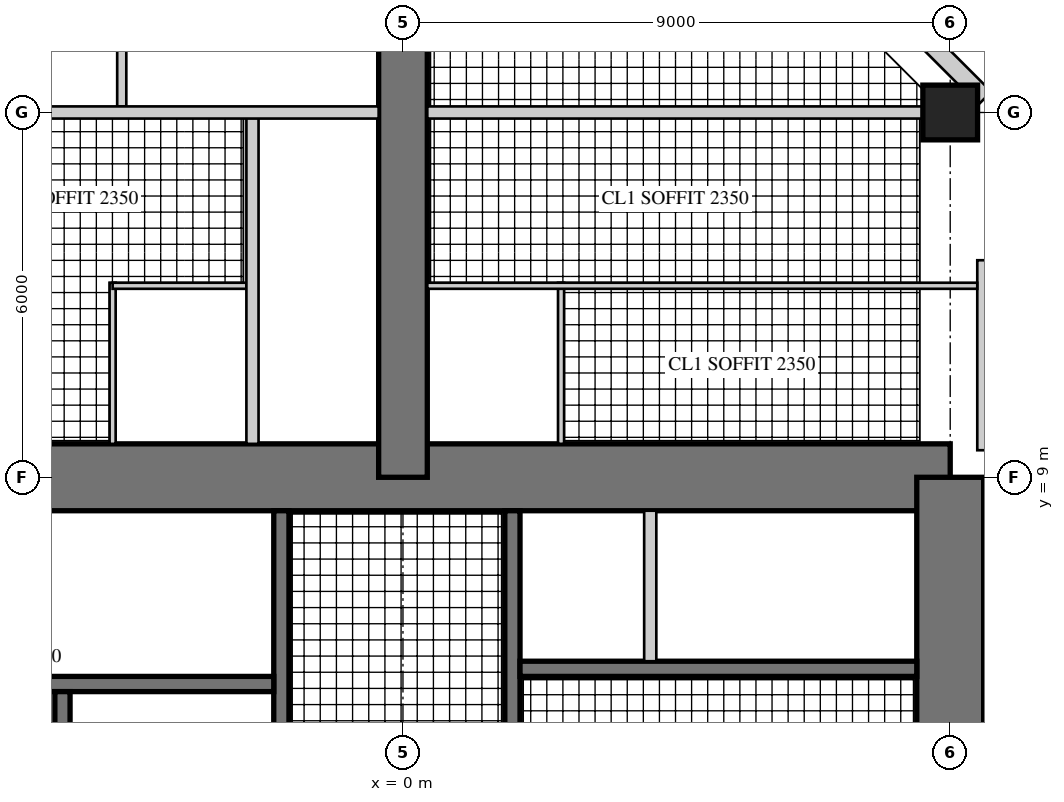
"""IFC4 building model, lengths in metres.
Left out: names, types, materials, properties, quantities, classifications, styles, units other than length and angle.
Written with IfcOpenShell. Run it as: python <this file> out.ifc"""

import sys

from ifc_helpers import new_model, si_unit, direction, frame, frame_2d, origin, origin_2d, place, context, subcontext, project, spatial, rectangle, hollow_rectangle, extrude, element, fill, save


model = new_model("IFC4")
c1 = context("Model", 3, precision=1e-05, world=origin(), true_north=direction((0.0, 1.0)))
c2 = subcontext(c1, "Body", "Model", "MODEL_VIEW")
j1 = project(units=[si_unit("LENGTHUNIT", "METRE"), si_unit("PLANEANGLEUNIT", "RADIAN")], contexts=[c1])
p1 = place(None, origin())
s1 = spatial("IfcSite", under=j1, at=p1, CompositionType="ELEMENT")
p2 = place(p1, origin())
s2 = spatial("IfcBuilding", under=s1, at=p2, CompositionType="ELEMENT")
p3 = place(p2, frame((0.0, 0.0, 200.1)))
s3 = spatial("IfcBuildingStorey", under=s2, at=p3, CompositionType="ELEMENT", Elevation=200.1)
p4 = place(p3, frame((9.0, 9.0, 0.0), z_axis=(0.0, 0.0, 1.0), x_axis=(-1.0, 0.0, 0.0)))
e1 = element("IfcWall", 1, at=p4, inside=s3, PredefinedType="SHEAR", context=c2, shape_type="SweptSolid", body=[
    extrude(rectangle(XDim=18.0, YDim=1.1, at=frame_2d((9.0, 0.0))), origin(), (0.0, 0.0, 1.0), 3.4),
])
p5 = place(p4, frame((9.8, 0.0, 0.0)))
e2 = element("IfcOpeningElement", 2, at=p5, cuts=e1, PredefinedType="OPENING", context=c2, shape_type="SweptSolid", body=[
    extrude(rectangle(XDim=1.0, YDim=2.4, at=frame_2d((0.5, 1.2))), frame((0.0, 0.56, 0.0), z_axis=(0.0, -1.0, 0.0), x_axis=(1.0, 0.0, 0.0)), (0.0, 0.0, 1.0), 1.12),
])
p6 = place(p3, frame((9.0, -9.0, 0.0), z_axis=(0.0, 0.0, 1.0), x_axis=(0.0, 1.0, 0.0)))
e3 = element("IfcWall", 3, at=p6, inside=s3, PredefinedType="SHEAR", context=c2, shape_type="SweptSolid", body=[
    extrude(rectangle(XDim=18.0, YDim=1.1, at=frame_2d((9.0, 0.0))), origin(), (0.0, 0.0, 1.0), 3.4),
])
p7 = place(p6, frame((9.8, 0.0, 0.0)))
e4 = element("IfcOpeningElement", 4, at=p7, cuts=e3, PredefinedType="OPENING", context=c2, shape_type="SweptSolid", body=[
    extrude(rectangle(XDim=1.0, YDim=2.4, at=frame_2d((0.5, 1.2))), frame((0.0, 0.56, 0.0), z_axis=(0.0, -1.0, 0.0), x_axis=(1.0, 0.0, 0.0)), (0.0, 0.0, 1.0), 1.12),
])
p8 = place(p3, frame((1.8, 1.875, 0.0), z_axis=(0.0, 0.0, 1.0), x_axis=(0.0, 1.0, 0.0)))
e5 = element("IfcWall", 5, at=p8, inside=s3, PredefinedType="SHEAR", context=c2, shape_type="SweptSolid", body=[
    extrude(rectangle(XDim=6.575, YDim=0.25, at=frame_2d((3.288, 0.0))), origin(), (0.0, 0.0, 1.0), 3.4),
])
p9 = place(p8, frame((1.875, 0.0, 0.0)))
e6 = element("IfcOpeningElement", 6, at=p9, cuts=e5, PredefinedType="OPENING", context=c2, shape_type="SweptSolid", body=[
    extrude(rectangle(XDim=1.6, YDim=2.4, at=frame_2d((0.8, 1.2))), frame((0.0, 0.135, 0.0), z_axis=(0.0, -1.0, 0.0), x_axis=(1.0, 0.0, 0.0)), (0.0, 0.0, 1.0), 0.27),
])
p10 = place(p3, frame((1.925, 5.85, 0.0), z_axis=(0.0, 0.0, 1.0), x_axis=(1.0, 0.0, 0.0)))
e7 = element("IfcWall", 7, at=p10, inside=s3, PredefinedType="SHEAR", context=c2, shape_type="SweptSolid", body=[
    extrude(rectangle(XDim=6.525, YDim=0.25, at=frame_2d((3.262, 0.0))), origin(), (0.0, 0.0, 1.0), 3.4),
])
p11 = place(p10, frame((0.521, 0.0, 0.0)))
e8 = element("IfcOpeningElement", 8, at=p11, cuts=e7, PredefinedType="OPENING", context=c2, shape_type="SweptSolid", body=[
    extrude(rectangle(XDim=1.0, YDim=2.1, at=frame_2d((0.5, 1.05))), frame((0.0, 0.135, 0.0), z_axis=(0.0, -1.0, 0.0), x_axis=(1.0, 0.0, 0.0)), (0.0, 0.0, 1.0), 0.27),
])
p12 = place(p10, frame((2.762, 0.0, 0.0)))
e9 = element("IfcOpeningElement", 9, at=p12, cuts=e7, PredefinedType="OPENING", context=c2, shape_type="SweptSolid", body=[
    extrude(rectangle(XDim=1.0, YDim=2.1, at=frame_2d((0.5, 1.05))), frame((0.0, 0.135, 0.0), z_axis=(0.0, -1.0, 0.0), x_axis=(1.0, 0.0, 0.0)), (0.0, 0.0, 1.0), 0.27),
])
p13 = place(p3, frame((4.067, 5.975, 0.0), z_axis=(0.0, 0.0, 1.0), x_axis=(0.0, 1.0, 0.0)))
e10 = element("IfcWall", 10, at=p13, inside=s3, PredefinedType="PARTITIONING", context=c2, shape_type="SweptSolid", body=[
    extrude(rectangle(XDim=2.475, YDim=0.2, at=frame_2d((1.237, 0.0))), origin(), (0.0, 0.0, 1.0), 3.4),
])
p14 = place(p3, frame((-2.0, 1.675, 0.0), z_axis=(0.0, 0.0, 1.0), x_axis=(0.0, 1.0, 0.0)))
e11 = element("IfcWall", 11, at=p14, inside=s3, PredefinedType="SHEAR", context=c2, shape_type="SweptSolid", body=[
    extrude(rectangle(XDim=6.775, YDim=0.25, at=frame_2d((3.387, 0.0))), origin(), (0.0, 0.0, 1.0), 3.4),
])
p15 = place(p14, frame((0.725, 0.0, 0.0)))
e12 = element("IfcOpeningElement", 12, at=p15, cuts=e11, PredefinedType="OPENING", context=c2, shape_type="SweptSolid", body=[
    extrude(rectangle(XDim=1.0, YDim=2.1, at=frame_2d((0.5, 1.05))), frame((0.0, 0.135, 0.0), z_axis=(0.0, -1.0, 0.0), x_axis=(1.0, 0.0, 0.0)), (0.0, 0.0, 1.0), 0.27),
])
p16 = place(p3, frame((-2.125, 5.6, 0.0), z_axis=(0.0, 0.0, 1.0), x_axis=(-1.0, 0.0, 0.0)))
e13 = element("IfcWall", 13, at=p16, inside=s3, PredefinedType="SHEAR", context=c2, shape_type="SweptSolid", body=[
    extrude(rectangle(XDim=6.325, YDim=0.25, at=frame_2d((3.163, 0.0))), origin(), (0.0, 0.0, 1.0), 3.4),
])
p17 = place(p16, frame((0.175, 0.0, 0.0)))
e14 = element("IfcOpeningElement", 14, at=p17, cuts=e13, PredefinedType="OPENING", context=c2, shape_type="SweptSolid", body=[
    extrude(rectangle(XDim=1.0, YDim=2.1, at=frame_2d((0.5, 1.05))), frame((0.0, 0.135, 0.0), z_axis=(0.0, -1.0, 0.0), x_axis=(1.0, 0.0, 0.0)), (0.0, 0.0, 1.0), 0.27),
])
p18 = place(p3, frame((-5.6, 1.925, 0.0), z_axis=(0.0, 0.0, 1.0), x_axis=(0.0, 1.0, 0.0)))
e15 = element("IfcWall", 15, at=p18, inside=s3, PredefinedType="SHEAR", context=c2, shape_type="SweptSolid", body=[
    extrude(rectangle(XDim=3.55, YDim=0.25, at=frame_2d((1.775, 0.0))), origin(), (0.0, 0.0, 1.0), 3.4),
])
p19 = place(p18, frame((1.525, 0.0, 0.0)))
e16 = element("IfcOpeningElement", 16, at=p19, cuts=e15, PredefinedType="OPENING", context=c2, shape_type="SweptSolid", body=[
    extrude(rectangle(XDim=1.1, YDim=2.2, at=frame_2d((0.55, 1.1))), frame((0.0, 0.135, 0.0), z_axis=(0.0, -1.0, 0.0), x_axis=(1.0, 0.0, 0.0)), (0.0, 0.0, 1.0), 0.27),
])
p20 = place(p18, frame((0.075, 0.0, 0.0)))
e17 = element("IfcOpeningElement", 17, at=p20, cuts=e15, PredefinedType="OPENING", context=c2, shape_type="SweptSolid", body=[
    extrude(rectangle(XDim=0.8, YDim=2.1, at=frame_2d((0.4, 1.05))), frame((0.0, 0.135, 0.0), z_axis=(0.0, -1.0, 0.0), x_axis=(1.0, 0.0, 0.0)), (0.0, 0.0, 1.0), 0.27),
])
p21 = place(p3, frame((0.0, 9.0, 0.0), z_axis=(0.0, 0.0, 1.0), x_axis=(0.0, 1.0, 0.0)))
e18 = element("IfcWall", 18, at=p21, inside=s3, PredefinedType="SHEAR", context=c2, shape_type="SweptSolid", body=[
    extrude(rectangle(XDim=9.0, YDim=0.8, at=frame_2d((4.5, 0.0))), origin(), (0.0, 0.0, 1.0), 3.4),
])
p22 = place(p21, frame((3.95, 0.0, 0.0)))
e19 = element("IfcOpeningElement", 19, at=p22, cuts=e18, PredefinedType="OPENING", context=c2, shape_type="SweptSolid", body=[
    extrude(rectangle(XDim=1.0, YDim=2.15, at=frame_2d((0.5, 1.075))), frame((0.0, 0.41, 0.0), z_axis=(0.0, -1.0, 0.0), x_axis=(1.0, 0.0, 0.0)), (0.0, 0.0, 1.0), 0.82),
])
p23 = place(p21, frame((7.0, 0.0, 0.0)))
e20 = element("IfcOpeningElement", 20, at=p23, cuts=e18, PredefinedType="OPENING", context=c2, shape_type="SweptSolid", body=[
    extrude(rectangle(XDim=1.0, YDim=2.2, at=frame_2d((0.5, 1.1))), frame((0.0, 0.41, 0.0), z_axis=(0.0, -1.0, 0.0), x_axis=(1.0, 0.0, 0.0)), (0.0, 0.0, 1.0), 0.82),
])
p24 = place(p3, frame((9.0, 15.0, 0.0), z_axis=(0.0, 0.0, 1.0), x_axis=(1.0, 0.0, 0.0)))
e21 = element("IfcColumn", 21, at=p24, inside=s3, PredefinedType="COLUMN", context=c2, shape_type="SweptSolid", body=[
    extrude(rectangle(XDim=0.9, YDim=0.9, at=origin_2d()), origin(), (0.0, 0.0, 1.0), 3.4),
])
p25 = place(p3, frame((9.57, 9.445, 0.0), z_axis=(0.0, 0.0, 1.0), x_axis=(0.0, 1.0, 0.0)))
e22 = element("IfcWall", 22, at=p25, inside=s3, PredefinedType="SOLIDWALL", context=c2, shape_type="SweptSolid", body=[
    extrude(rectangle(XDim=3.125, YDim=0.25, at=frame_2d((1.562, 0.0))), origin(), (0.0, 0.0, 1.0), 3.22),
])
p26 = place(p25, frame((0.6, 0.0, 0.0)))
e23 = element("IfcOpeningElement", 23, at=p26, cuts=e22, PredefinedType="OPENING", context=c2, shape_type="SweptSolid", body=[
    extrude(rectangle(XDim=1.0, YDim=2.2, at=frame_2d((0.5, 1.1))), frame((0.0, 0.135, 0.0), z_axis=(0.0, -1.0, 0.0), x_axis=(1.0, 0.0, 0.0)), (0.0, 0.0, 1.0), 0.27),
])
p27 = place(p3, frame((9.57, 15.236, 0.0), z_axis=(0.0, 0.0, 1.0), x_axis=(-0.707134062067, 0.707079499254, 0.0)))
e24 = element("IfcWall", 24, at=p27, inside=s3, PredefinedType="SOLIDWALL", context=c2, shape_type="SweptSolid", body=[
    extrude(rectangle(XDim=4.475, YDim=0.3, at=frame_2d((2.237, 0.0))), origin(), (0.0, 0.0, 1.0), 3.22),
])
p28 = place(p27, frame((1.787, 0.0, 0.3)))
e25 = element("IfcOpeningElement", 25, at=p28, cuts=e24, PredefinedType="OPENING", context=c2, shape_type="SweptSolid", body=[
    extrude(rectangle(XDim=0.9, YDim=2.4, at=frame_2d((0.45, 1.2))), frame((0.0, 0.16, 0.0), z_axis=(0.0, -1.0, 0.0), x_axis=(1.0, 0.0, 0.0)), (0.0, 0.0, 1.0), 0.32),
])
p29 = place(p3, frame((-4.775, 9.55, 0.0), z_axis=(0.0, 0.0, 1.0), x_axis=(0.0, 1.0, 0.0)))
e26 = element("IfcWall", 26, at=p29, inside=s3, PredefinedType="PARTITIONING", context=c2, shape_type="SweptSolid", body=[
    extrude(rectangle(XDim=2.65, YDim=0.1, at=frame_2d((1.325, 0.0))), origin(), (0.0, 0.0, 1.0), 3.22),
])
p30 = place(p3, frame((-2.575, 12.15, 0.0), z_axis=(0.0, 0.0, 1.0), x_axis=(-1.0, 0.0, 0.0)))
e27 = element("IfcWall", 27, at=p30, inside=s3, PredefinedType="PARTITIONING", context=c2, shape_type="SweptSolid", body=[
    extrude(rectangle(XDim=2.2, YDim=0.1, at=frame_2d((1.1, 0.0))), origin(), (0.0, 0.0, 1.0), 3.22),
])
p31 = place(p30, frame((0.55, 0.0, 0.0)))
e28 = element("IfcOpeningElement", 28, at=p31, cuts=e27, PredefinedType="OPENING", context=c2, shape_type="SweptSolid", body=[
    extrude(rectangle(XDim=0.9, YDim=2.1, at=frame_2d((0.45, 1.05))), frame((0.0, 0.06, 0.0), z_axis=(0.0, -1.0, 0.0), x_axis=(1.0, 0.0, 0.0)), (0.0, 0.0, 1.0), 0.12),
])
p32 = place(p3, frame((2.6, 9.55, 0.0), z_axis=(0.0, 0.0, 1.0), x_axis=(0.0, 1.0, 0.0)))
e29 = element("IfcWall", 29, at=p32, inside=s3, PredefinedType="PARTITIONING", context=c2, shape_type="SweptSolid", body=[
    extrude(rectangle(XDim=2.65, YDim=0.1, at=frame_2d((1.325, 0.0))), origin(), (0.0, 0.0, 1.0), 3.22),
])
p33 = place(p3, frame((9.445, 12.15, 0.0), z_axis=(0.0, 0.0, 1.0), x_axis=(-1.0, 0.0, 0.0)))
e30 = element("IfcWall", 30, at=p33, inside=s3, PredefinedType="PARTITIONING", context=c2, shape_type="SweptSolid", body=[
    extrude(rectangle(XDim=9.045, YDim=0.1, at=frame_2d((4.522, 0.0))), origin(), (0.0, 0.0, 1.0), 3.22),
])
p34 = place(p33, frame((5.495, 0.0, 0.0)))
e31 = element("IfcOpeningElement", 31, at=p34, cuts=e30, PredefinedType="OPENING", context=c2, shape_type="SweptSolid", body=[
    extrude(rectangle(XDim=0.9, YDim=2.1, at=frame_2d((0.45, 1.05))), frame((0.0, 0.06, 0.0), z_axis=(0.0, -1.0, 0.0), x_axis=(1.0, 0.0, 0.0)), (0.0, 0.0, 1.0), 0.12),
])
p35 = place(p33, frame((7.595, 0.0, 0.0)))
e32 = element("IfcOpeningElement", 32, at=p35, cuts=e30, PredefinedType="OPENING", context=c2, shape_type="SweptSolid", body=[
    extrude(rectangle(XDim=0.9, YDim=2.1, at=frame_2d((0.45, 1.05))), frame((0.0, 0.06, 0.0), z_axis=(0.0, -1.0, 0.0), x_axis=(1.0, 0.0, 0.0)), (0.0, 0.0, 1.0), 0.12),
])
p36 = place(p3, frame((-2.475, 9.55, 0.0), z_axis=(0.0, 0.0, 1.0), x_axis=(0.0, 1.0, 0.0)))
e33 = element("IfcWall", 33, at=p36, inside=s3, PredefinedType="SOLIDWALL", context=c2, shape_type="SweptSolid", body=[
    extrude(rectangle(XDim=5.45, YDim=0.2, at=frame_2d((2.725, 0.0))), origin(), (0.0, 0.0, 1.0), 3.22),
])
p37 = place(p36, frame((3.4, 0.0, 0.0)))
e34 = element("IfcOpeningElement", 34, at=p37, cuts=e33, PredefinedType="OPENING", context=c2, shape_type="SweptSolid", body=[
    extrude(rectangle(XDim=1.0, YDim=2.15, at=frame_2d((0.5, 1.075))), frame((0.0, 0.11, 0.0), z_axis=(0.0, -1.0, 0.0), x_axis=(1.0, 0.0, 0.0)), (0.0, 0.0, 1.0), 0.22),
])
p38 = place(p3, frame((-4.625, 15.1, 0.0), z_axis=(0.0, 0.0, 1.0), x_axis=(0.0, 1.0, 0.0)))
e35 = element("IfcWall", 35, at=p38, inside=s3, PredefinedType="PARTITIONING", context=c2, shape_type="SweptSolid", body=[
    extrude(rectangle(XDim=2.5, YDim=0.15, at=frame_2d((1.25, 0.0))), origin(), (0.0, 0.0, 1.0), 3.22),
])
p39 = place(p38, frame((0.6, 0.0, 0.0)))
e36 = element("IfcOpeningElement", 36, at=p39, cuts=e35, PredefinedType="OPENING", context=c2, shape_type="SweptSolid", body=[
    extrude(rectangle(XDim=1.0, YDim=2.1, at=frame_2d((0.5, 1.05))), frame((0.0, 0.085, 0.0), z_axis=(0.0, -1.0, 0.0), x_axis=(1.0, 0.0, 0.0)), (0.0, 0.0, 1.0), 0.17),
])
p40 = place(p3, frame((8.55, 15.0, 0.0), z_axis=(0.0, 0.0, 1.0), x_axis=(-1.0, 0.0, 0.0)))
e37 = element("IfcWall", 37, at=p40, inside=s3, PredefinedType="SOLIDWALL", context=c2, shape_type="SweptSolid", body=[
    extrude(rectangle(XDim=8.15, YDim=0.2, at=frame_2d((4.075, 0.0))), origin(), (0.0, 0.0, 1.0), 2.47),
])
p41 = place(p3, frame((-0.4, 15.0, 0.0), z_axis=(0.0, 0.0, 1.0), x_axis=(-1.0, 0.0, 0.0)))
e38 = element("IfcWall", 38, at=p41, inside=s3, PredefinedType="SOLIDWALL", context=c2, shape_type="SweptSolid", body=[
    extrude(rectangle(XDim=8.15, YDim=0.2, at=frame_2d((4.075, 0.0))), origin(), (0.0, 0.0, 1.0), 2.47),
])
p42 = place(p41, frame((0.4, 0.0, 0.0)))
e39 = element("IfcOpeningElement", 39, at=p42, cuts=e38, PredefinedType="OPENING", context=c2, shape_type="SweptSolid", body=[
    extrude(rectangle(XDim=1.0, YDim=2.2, at=frame_2d((0.5, 1.1))), frame((0.0, 0.11, 0.0), z_axis=(0.0, -1.0, 0.0), x_axis=(1.0, 0.0, 0.0)), (0.0, 0.0, 1.0), 0.22),
])
p43 = place(p26, origin())
e40 = element("IfcDoor", 40, at=p43, inside=s3, OperationType="SINGLE_SWING_LEFT", PredefinedType="DOOR", context=c2, shape_type="SweptSolid", body=[
    extrude(hollow_rectangle(XDim=1.0, YDim=2.2, WallThickness=0.06, at=frame_2d((0.5, 1.1))), frame((0.0, 0.025, 0.0), z_axis=(0.0, -1.0, 0.0), x_axis=(1.0, 0.0, 0.0)), (0.0, 0.0, 1.0), 0.05),
    extrude(rectangle(XDim=0.879, YDim=2.079, at=frame_2d((0.5, 1.1))), frame((0.0, 0.025, 0.0), z_axis=(0.0, -1.0, 0.0), x_axis=(1.0, 0.0, 0.0)), (0.0, 0.0, 1.0), 0.05),
])
fill(e23, e40)
p44 = place(p31, origin())
e41 = element("IfcDoor", 41, at=p44, inside=s3, OperationType="SINGLE_SWING_LEFT", PredefinedType="DOOR", context=c2, shape_type="SweptSolid", body=[
    extrude(rectangle(XDim=0.9, YDim=2.1, at=frame_2d((0.45, 1.05))), frame((0.0, 0.025, 0.0), z_axis=(0.0, -1.0, 0.0), x_axis=(1.0, 0.0, 0.0)), (0.0, 0.0, 1.0), 0.05),
])
fill(e28, e41)
p45 = place(p34, origin())
e42 = element("IfcDoor", 42, at=p45, inside=s3, OperationType="SINGLE_SWING_RIGHT", PredefinedType="DOOR", context=c2, shape_type="SweptSolid", body=[
    extrude(rectangle(XDim=0.9, YDim=2.1, at=frame_2d((0.45, 1.05))), frame((0.0, 0.025, 0.0), z_axis=(0.0, -1.0, 0.0), x_axis=(1.0, 0.0, 0.0)), (0.0, 0.0, 1.0), 0.05),
])
fill(e31, e42)
p46 = place(p35, origin())
e43 = element("IfcDoor", 43, at=p46, inside=s3, OperationType="SINGLE_SWING_RIGHT", PredefinedType="DOOR", context=c2, shape_type="SweptSolid", body=[
    extrude(rectangle(XDim=0.9, YDim=2.1, at=frame_2d((0.45, 1.05))), frame((0.0, 0.025, 0.0), z_axis=(0.0, -1.0, 0.0), x_axis=(1.0, 0.0, 0.0)), (0.0, 0.0, 1.0), 0.05),
])
fill(e32, e43)
p47 = place(p37, origin())
e44 = element("IfcDoor", 44, at=p47, inside=s3, OperationType="SINGLE_SWING_LEFT", PredefinedType="DOOR", context=c2, shape_type="SweptSolid", body=[
    extrude(rectangle(XDim=1.0, YDim=2.15, at=frame_2d((0.5, 1.075))), frame((0.0, 0.025, 0.0), z_axis=(0.0, -1.0, 0.0), x_axis=(1.0, 0.0, 0.0)), (0.0, 0.0, 1.0), 0.05),
])
fill(e34, e44)
p48 = place(p39, origin())
e45 = element("IfcDoor", 45, at=p48, inside=s3, OperationType="SINGLE_SWING_LEFT", PredefinedType="DOOR", context=c2, shape_type="SweptSolid", body=[
    extrude(rectangle(XDim=1.0, YDim=2.1, at=frame_2d((0.5, 1.05))), frame((0.0, 0.025, 0.0), z_axis=(0.0, -1.0, 0.0), x_axis=(1.0, 0.0, 0.0)), (0.0, 0.0, 1.0), 0.05),
])
fill(e36, e45)
p49 = place(p42, frame((1.0, 0.0, 0.0), z_axis=(0.0, 0.0, 1.0), x_axis=(-1.0, 0.0, 0.0)))
e46 = element("IfcDoor", 46, at=p49, inside=s3, OperationType="SINGLE_SWING_RIGHT", PredefinedType="DOOR", context=c2, shape_type="SweptSolid", body=[
    extrude(rectangle(XDim=1.0, YDim=2.2, at=frame_2d((0.5, 1.1))), frame((0.0, 0.025, 0.0), z_axis=(0.0, -1.0, 0.0), x_axis=(1.0, 0.0, 0.0)), (0.0, 0.0, 1.0), 0.05),
])
fill(e39, e46)
p50 = place(p22, frame((1.0, 0.0, 0.0), z_axis=(0.0, 0.0, 1.0), x_axis=(-1.0, 0.0, 0.0)))
e47 = element("IfcDoor", 47, at=p50, inside=s3, OperationType="SINGLE_SWING_RIGHT", PredefinedType="DOOR", context=c2, shape_type="SweptSolid", body=[
    extrude(rectangle(XDim=1.0, YDim=2.15, at=frame_2d((0.5, 1.075))), frame((0.0, 0.025, 0.0), z_axis=(0.0, -1.0, 0.0), x_axis=(1.0, 0.0, 0.0)), (0.0, 0.0, 1.0), 0.05),
])
fill(e19, e47)
p51 = place(p5, origin())
e48 = element("IfcDoor", 48, at=p51, inside=s3, OperationType="SINGLE_SWING_RIGHT", PredefinedType="DOOR", context=c2, shape_type="SweptSolid", body=[
    extrude(rectangle(XDim=1.0, YDim=2.4, at=frame_2d((0.5, 1.2))), frame((0.0, 0.055, 0.0), z_axis=(0.0, -1.0, 0.0), x_axis=(1.0, 0.0, 0.0)), (0.0, 0.0, 1.0), 0.05),
])
fill(e2, e48)
p52 = place(p9, frame((1.6, 0.0, 0.0), z_axis=(0.0, 0.0, 1.0), x_axis=(-1.0, 0.0, 0.0)))
e49 = element("IfcDoor", 49, at=p52, inside=s3, OperationType="DOUBLE_DOOR_SINGLE_SWING", PredefinedType="DOOR", context=c2, shape_type="SweptSolid", body=[
    extrude(rectangle(XDim=1.6, YDim=2.4, at=frame_2d((0.8, 1.2))), frame((0.0, 0.025, 0.0), z_axis=(0.0, -1.0, 0.0), x_axis=(1.0, 0.0, 0.0)), (0.0, 0.0, 1.0), 0.05),
])
fill(e6, e49)
p53 = place(p17, frame((1.0, 0.0, 0.0), z_axis=(0.0, 0.0, 1.0), x_axis=(-1.0, 0.0, 0.0)))
e50 = element("IfcDoor", 50, at=p53, inside=s3, OperationType="SINGLE_SWING_RIGHT", PredefinedType="DOOR", context=c2, shape_type="SweptSolid", body=[
    extrude(rectangle(XDim=1.0, YDim=2.1, at=frame_2d((0.5, 1.05))), frame((0.0, 0.025, 0.0), z_axis=(0.0, -1.0, 0.0), x_axis=(1.0, 0.0, 0.0)), (0.0, 0.0, 1.0), 0.05),
])
fill(e14, e50)
p54 = place(p11, origin())
e51 = element("IfcDoor", 51, at=p54, inside=s3, OperationType="SINGLE_SWING_LEFT", PredefinedType="DOOR", context=c2, shape_type="SweptSolid", body=[
    extrude(rectangle(XDim=1.0, YDim=2.1, at=frame_2d((0.5, 1.05))), frame((0.0, 0.025, 0.0), z_axis=(0.0, -1.0, 0.0), x_axis=(1.0, 0.0, 0.0)), (0.0, 0.0, 1.0), 0.05),
])
fill(e8, e51)
p55 = place(p12, origin())
e52 = element("IfcDoor", 52, at=p55, inside=s3, OperationType="SINGLE_SWING_LEFT", PredefinedType="DOOR", context=c2, shape_type="SweptSolid", body=[
    extrude(rectangle(XDim=1.0, YDim=2.1, at=frame_2d((0.5, 1.05))), frame((0.0, 0.025, 0.0), z_axis=(0.0, -1.0, 0.0), x_axis=(1.0, 0.0, 0.0)), (0.0, 0.0, 1.0), 0.05),
])
fill(e9, e52)
save(model, sys.argv[1])
